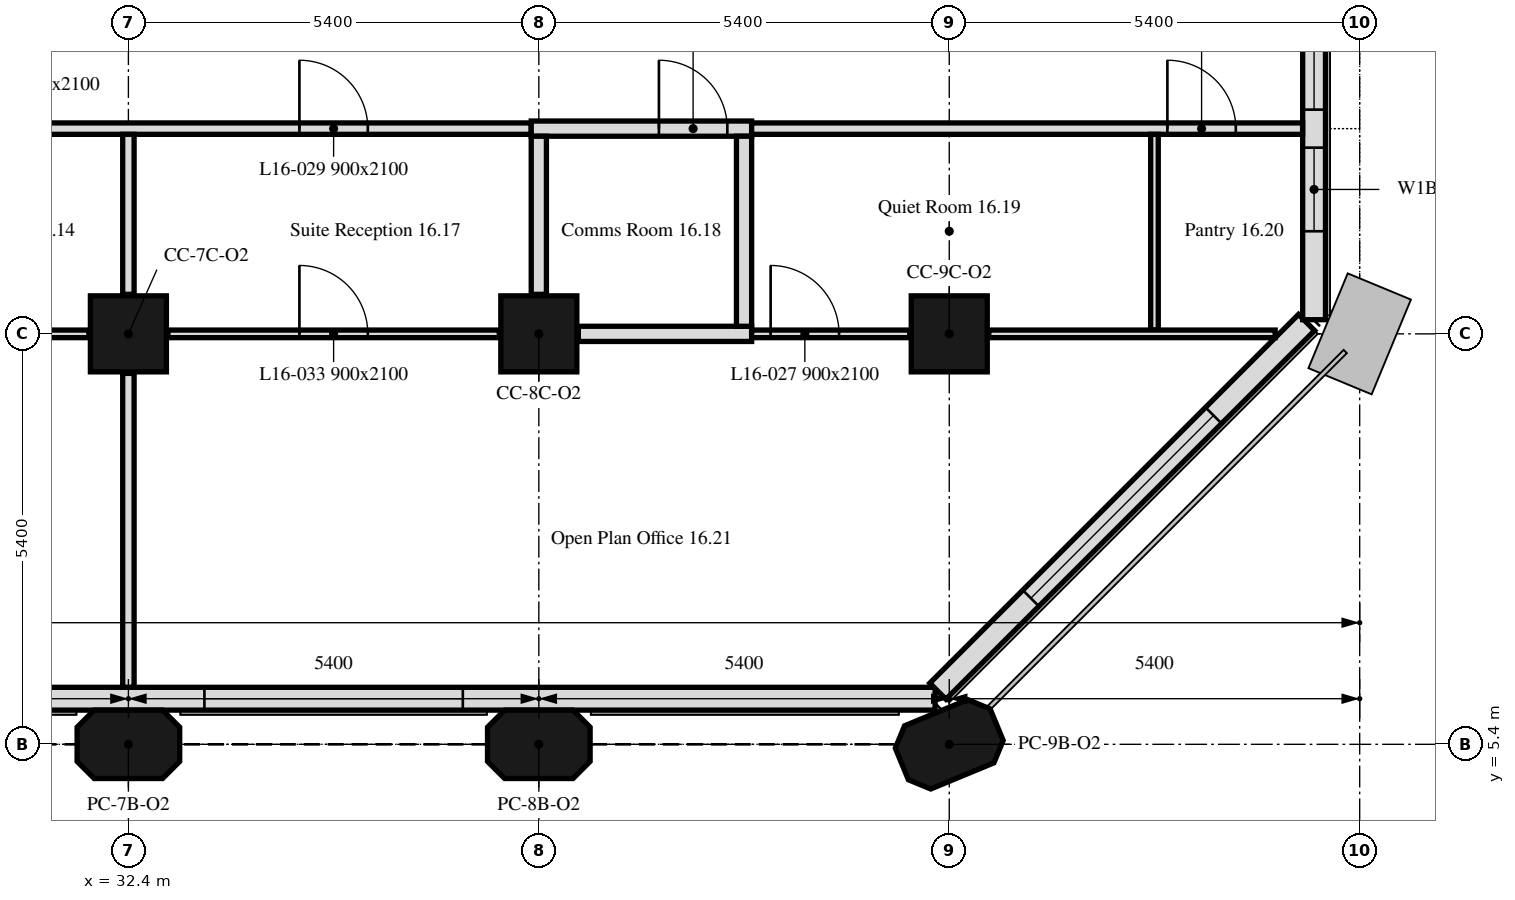
"""IFC4 building model, lengths in metres.
Left out: names, types, materials, properties, quantities, classifications, styles, units other than length and angle.
Written with IfcOpenShell. Run it as: python <this file> out.ifc"""

import sys

from ifc_helpers import new_model, si_unit, direction, frame, frame_2d, origin, origin_2d, place, context, subcontext, project, spatial, polyline, rectangle, outline, extrude, element, fill, save


model = new_model("IFC4")
c1 = context("Model", 3, precision=1e-05, world=origin(), true_north=direction((0.0, 1.0)))
c2 = subcontext(c1, "Body", "Model", "MODEL_VIEW")
j1 = project(units=[si_unit("LENGTHUNIT", "METRE"), si_unit("PLANEANGLEUNIT", "RADIAN")], contexts=[c1])
p1 = place(None, origin())
s1 = spatial("IfcSite", under=j1, at=p1, CompositionType="ELEMENT")
p2 = place(p1, origin())
s2 = spatial("IfcBuilding", under=s1, at=p2, CompositionType="ELEMENT")
p3 = place(p2, frame((0.0, 0.0, 72.6)))
s3 = spatial("IfcBuildingStorey", under=s2, at=p3, CompositionType="ELEMENT", Elevation=72.6)
for number, where, z_axis, x_axis in (
    (1, (32.4, 5.4, 0.0), (0.0, 0.0, 1.0), (1.0, 0.0, 0.0)),
    (2, (37.8, 5.4, 0.0), (0.0, 0.0, 1.0), (1.0, 0.0, 0.0)),
    (3, (43.2, 5.4, 0.0), (0.0, 0.0, 1.0), (0.924, 0.383, 0.0)),
):
    element("IfcColumn", number, at=place(p3, frame(where, z_axis=z_axis, x_axis=x_axis)), inside=s3, PredefinedType="COLUMN", context=c2, shape_type="SweptSolid", body=[
        extrude(outline(polyline([(-0.45, -0.45), (0.45, -0.45), (0.675, -0.225), (0.675, 0.225), (0.45, 0.45), (-0.45, 0.45), (-0.675, 0.225), (-0.675, -0.225), (-0.45, -0.45)])), origin(), (0.0, 0.0, 1.0), 3.5),
    ])
for number, where, z_axis, x_axis in (
    (4, (32.4, 10.8, 0.0), (0.0, 0.0, 1.0), (1.0, 0.0, 0.0)),
    (5, (37.8, 10.8, 0.0), (0.0, 0.0, 1.0), (1.0, 0.0, 0.0)),
    (6, (43.2, 10.8, 0.0), (0.0, 0.0, 1.0), (1.0, 0.0, 0.0)),
):
    element("IfcColumn", number, at=place(p3, frame(where, z_axis=z_axis, x_axis=x_axis)), inside=s3, PredefinedType="COLUMN", context=c2, shape_type="SweptSolid", body=[
        extrude(rectangle(XDim=1.0, YDim=1.0, at=origin_2d()), origin(), (0.0, 0.0, 1.0), 3.5),
    ])
p4 = place(p3, frame((10.986, 6.0, 0.0), z_axis=(0.0, 0.0, 1.0), x_axis=(1.0, 0.0, 0.0)))
e7 = element("IfcWall", 7, at=p4, inside=s3, PredefinedType="SOLIDWALL", context=c2, shape_type="SweptSolid", body=[
    extrude(rectangle(XDim=32.027, YDim=0.3, at=frame_2d((16.014, 0.0))), origin(), (0.0, 0.0, 1.0), 3.5),
])
p5 = place(p4, frame((0.814, 0.0, 0.9)))
e8 = element("IfcOpeningElement", 8, at=p5, cuts=e7, PredefinedType="OPENING", context=c2, shape_type="SweptSolid", body=[
    extrude(rectangle(XDim=3.4, YDim=1.7, at=frame_2d((1.7, 0.85))), frame((0.0, 0.16, 0.0), z_axis=(0.0, -1.0, 0.0), x_axis=(1.0, 0.0, 0.0)), (0.0, 0.0, 1.0), 0.32),
])
p6 = place(p4, frame((11.614, 0.0, 0.9)))
e9 = element("IfcOpeningElement", 9, at=p6, cuts=e7, PredefinedType="OPENING", context=c2, shape_type="SweptSolid", body=[
    extrude(rectangle(XDim=3.4, YDim=1.7, at=frame_2d((1.7, 0.85))), frame((0.0, 0.16, 0.0), z_axis=(0.0, -1.0, 0.0), x_axis=(1.0, 0.0, 0.0)), (0.0, 0.0, 1.0), 0.32),
])
p7 = place(p4, frame((22.414, 0.0, 0.9)))
e10 = element("IfcOpeningElement", 10, at=p7, cuts=e7, PredefinedType="OPENING", context=c2, shape_type="SweptSolid", body=[
    extrude(rectangle(XDim=3.4, YDim=1.7, at=frame_2d((1.7, 0.85))), frame((0.0, 0.16, 0.0), z_axis=(0.0, -1.0, 0.0), x_axis=(1.0, 0.0, 0.0)), (0.0, 0.0, 1.0), 0.32),
])
p8 = place(p3, frame((43.051, 6.099, 0.0), z_axis=(0.0, 0.0, 1.0), x_axis=(0.707106781187, 0.707106781187, 0.0)))
e11 = element("IfcWall", 11, at=p8, inside=s3, PredefinedType="SOLIDWALL", context=c2, shape_type="SweptSolid", body=[
    extrude(rectangle(XDim=6.86, YDim=0.3, at=frame_2d((3.43, 0.0))), origin(), (0.0, 0.0, 1.0), 3.5),
])
p9 = place(p8, frame((1.73, 0.0, 0.9)))
e12 = element("IfcOpeningElement", 12, at=p9, cuts=e11, PredefinedType="OPENING", context=c2, shape_type="SweptSolid", body=[
    extrude(rectangle(XDim=3.4, YDim=1.7, at=frame_2d((1.7, 0.85))), frame((0.0, 0.16, 0.0), z_axis=(0.0, -1.0, 0.0), x_axis=(1.0, 0.0, 0.0)), (0.0, 0.0, 1.0), 0.32),
])
p10 = place(p3, frame((48.0, 10.986, 0.0), z_axis=(0.0, 0.0, 1.0), x_axis=(0.0, 1.0, 0.0)))
e13 = element("IfcWall", 13, at=p10, inside=s3, PredefinedType="SOLIDWALL", context=c2, shape_type="SweptSolid", body=[
    extrude(rectangle(XDim=32.027, YDim=0.3, at=frame_2d((16.014, 0.0))), origin(), (0.0, 0.0, 1.0), 3.5),
])
p11 = place(p10, frame((1.164, 0.0, 0.9)))
e14 = element("IfcOpeningElement", 14, at=p11, cuts=e13, PredefinedType="OPENING", context=c2, shape_type="SweptSolid", body=[
    extrude(rectangle(XDim=1.1, YDim=1.7, at=frame_2d((0.55, 0.85))), frame((0.0, 0.16, 0.0), z_axis=(0.0, -1.0, 0.0), x_axis=(1.0, 0.0, 0.0)), (0.0, 0.0, 1.0), 0.32),
])
p12 = place(p10, frame((2.764, 0.0, 0.9)))
e15 = element("IfcOpeningElement", 15, at=p12, cuts=e13, PredefinedType="OPENING", context=c2, shape_type="SweptSolid", body=[
    extrude(rectangle(XDim=1.1, YDim=1.7, at=frame_2d((0.55, 0.85))), frame((0.0, 0.16, 0.0), z_axis=(0.0, -1.0, 0.0), x_axis=(1.0, 0.0, 0.0)), (0.0, 0.0, 1.0), 0.32),
])
p13 = place(p10, frame((11.614, 0.0, 0.9)))
e16 = element("IfcOpeningElement", 16, at=p13, cuts=e13, PredefinedType="OPENING", context=c2, shape_type="SweptSolid", body=[
    extrude(rectangle(XDim=3.4, YDim=1.7, at=frame_2d((1.7, 0.85))), frame((0.0, 0.16, 0.0), z_axis=(0.0, -1.0, 0.0), x_axis=(1.0, 0.0, 0.0)), (0.0, 0.0, 1.0), 0.32),
])
p14 = place(p10, frame((22.764, 0.0, 0.9)))
e17 = element("IfcOpeningElement", 17, at=p14, cuts=e13, PredefinedType="OPENING", context=c2, shape_type="SweptSolid", body=[
    extrude(rectangle(XDim=1.1, YDim=1.7, at=frame_2d((0.55, 0.85))), frame((0.0, 0.16, 0.0), z_axis=(0.0, -1.0, 0.0), x_axis=(1.0, 0.0, 0.0)), (0.0, 0.0, 1.0), 0.32),
])
p15 = place(p10, frame((24.364, 0.0, 0.9)))
e18 = element("IfcOpeningElement", 18, at=p15, cuts=e13, PredefinedType="OPENING", context=c2, shape_type="SweptSolid", body=[
    extrude(rectangle(XDim=1.1, YDim=1.7, at=frame_2d((0.55, 0.85))), frame((0.0, 0.16, 0.0), z_axis=(0.0, -1.0, 0.0), x_axis=(1.0, 0.0, 0.0)), (0.0, 0.0, 1.0), 0.32),
])
p16 = place(p3, frame((24.4, 13.5, 0.0), z_axis=(0.0, 0.0, 1.0), x_axis=(1.0, 0.0, 0.0)))
e19 = element("IfcWall", 19, at=p16, inside=s3, PredefinedType="PARTITIONING", context=c2, shape_type="SweptSolid", body=[
    extrude(rectangle(XDim=13.3, YDim=0.15, at=frame_2d((6.65, 0.0))), origin(), (0.0, 0.0, 1.0), 3.5),
])
p17 = place(p16, frame((10.25, 0.0, 0.0)))
e20 = element("IfcOpeningElement", 20, at=p17, cuts=e19, PredefinedType="OPENING", context=c2, shape_type="SweptSolid", body=[
    extrude(rectangle(XDim=0.9, YDim=2.1, at=frame_2d((0.45, 1.05))), frame((0.0, 0.075, 0.0), z_axis=(0.0, -1.0, 0.0), x_axis=(1.0, 0.0, 0.0)), (0.0, 0.0, 1.0), 0.15),
])
p18 = place(p16, frame((4.23, 0.0, 0.0)))
e21 = element("IfcOpeningElement", 21, at=p18, cuts=e19, PredefinedType="OPENING", context=c2, shape_type="SweptSolid", body=[
    extrude(rectangle(XDim=0.9, YDim=2.1, at=frame_2d((0.45, 1.05))), frame((0.0, 0.075, 0.0), z_axis=(0.0, -1.0, 0.0), x_axis=(1.0, 0.0, 0.0)), (0.0, 0.0, 1.0), 0.15),
])
p19 = place(p3, frame((37.7, 13.5, 0.0), z_axis=(0.0, 0.0, 1.0), x_axis=(1.0, 0.0, 0.0)))
e22 = element("IfcWall", 22, at=p19, inside=s3, PredefinedType="PARTITIONING", context=c2, shape_type="SweptSolid", body=[
    extrude(rectangle(XDim=2.9, YDim=0.2, at=frame_2d((1.45, 0.0))), origin(), (0.0, 0.0, 1.0), 3.5),
])
p20 = place(p19, frame((1.68, 0.0, 0.0)))
e23 = element("IfcOpeningElement", 23, at=p20, cuts=e22, PredefinedType="OPENING", context=c2, shape_type="SweptSolid", body=[
    extrude(rectangle(XDim=0.9, YDim=2.1, at=frame_2d((0.45, 1.05))), frame((0.0, 0.1, 0.0), z_axis=(0.0, -1.0, 0.0), x_axis=(1.0, 0.0, 0.0)), (0.0, 0.0, 1.0), 0.2),
])
p21 = place(p3, frame((40.6, 13.5, 0.0), z_axis=(0.0, 0.0, 1.0), x_axis=(1.0, 0.0, 0.0)))
e24 = element("IfcWall", 24, at=p21, inside=s3, PredefinedType="PARTITIONING", context=c2, shape_type="SweptSolid", body=[
    extrude(rectangle(XDim=7.249, YDim=0.15, at=frame_2d((3.625, 0.0))), origin(), (0.0, 0.0, 1.0), 3.5),
])
p22 = place(p21, frame((5.47, 0.0, 0.0)))
e25 = element("IfcOpeningElement", 25, at=p22, cuts=e24, PredefinedType="OPENING", context=c2, shape_type="SweptSolid", body=[
    extrude(rectangle(XDim=0.9, YDim=2.1, at=frame_2d((0.45, 1.05))), frame((0.0, 0.075, 0.0), z_axis=(0.0, -1.0, 0.0), x_axis=(1.0, 0.0, 0.0)), (0.0, 0.0, 1.0), 0.15),
])
p23 = place(p3, frame((27.52, 10.8, 0.0), z_axis=(0.0, 0.0, 1.0), x_axis=(1.0, 0.0, 0.0)))
e26 = element("IfcWall", 26, at=p23, inside=s3, PredefinedType="PARTITIONING", context=c2, shape_type="SweptSolid", body=[
    extrude(rectangle(XDim=4.36, YDim=0.1, at=frame_2d((2.18, 0.0))), origin(), (0.0, 0.0, 1.0), 3.5),
])
p24 = place(p3, frame((32.4, 11.32, 0.0), z_axis=(0.0, 0.0, 1.0), x_axis=(0.0, 1.0, 0.0)))
e27 = element("IfcWall", 27, at=p24, inside=s3, PredefinedType="PARTITIONING", context=c2, shape_type="SweptSolid", body=[
    extrude(rectangle(XDim=2.105, YDim=0.15, at=frame_2d((1.052, 0.0))), origin(), (0.0, 0.0, 1.0), 3.5),
])
p25 = place(p3, frame((32.4, 6.151, 0.0), z_axis=(0.0, 0.0, 1.0), x_axis=(0.0, 1.0, 0.0)))
e28 = element("IfcWall", 28, at=p25, inside=s3, PredefinedType="PARTITIONING", context=c2, shape_type="SweptSolid", body=[
    extrude(rectangle(XDim=4.129, YDim=0.15, at=frame_2d((2.064, 0.0))), origin(), (0.0, 0.0, 1.0), 3.5),
])
p26 = place(p3, frame((32.92, 10.8, 0.0), z_axis=(0.0, 0.0, 1.0), x_axis=(1.0, 0.0, 0.0)))
e29 = element("IfcWall", 29, at=p26, inside=s3, PredefinedType="PARTITIONING", context=c2, shape_type="SweptSolid", body=[
    extrude(rectangle(XDim=4.36, YDim=0.1, at=frame_2d((2.18, 0.0))), origin(), (0.0, 0.0, 1.0), 3.5),
])
p27 = place(p26, frame((1.73, 0.0, 0.0)))
e30 = element("IfcOpeningElement", 30, at=p27, cuts=e29, PredefinedType="OPENING", context=c2, shape_type="SweptSolid", body=[
    extrude(rectangle(XDim=0.9, YDim=2.1, at=frame_2d((0.45, 1.05))), frame((0.0, 0.05, 0.0), z_axis=(0.0, -1.0, 0.0), x_axis=(1.0, 0.0, 0.0)), (0.0, 0.0, 1.0), 0.1),
])
p28 = place(p3, frame((37.8, 11.32, 0.0), z_axis=(0.0, 0.0, 1.0), x_axis=(0.0, 1.0, 0.0)))
e31 = element("IfcWall", 31, at=p28, inside=s3, PredefinedType="PARTITIONING", context=c2, shape_type="SweptSolid", body=[
    extrude(rectangle(XDim=2.08, YDim=0.2, at=frame_2d((1.04, 0.0))), origin(), (0.0, 0.0, 1.0), 3.5),
])
p29 = place(p3, frame((38.32, 10.8, 0.0), z_axis=(0.0, 0.0, 1.0), x_axis=(1.0, 0.0, 0.0)))
e32 = element("IfcWall", 32, at=p29, inside=s3, PredefinedType="PARTITIONING", context=c2, shape_type="SweptSolid", body=[
    extrude(rectangle(XDim=2.28, YDim=0.2, at=frame_2d((1.14, 0.0))), origin(), (0.0, 0.0, 1.0), 3.5),
])
p30 = place(p3, frame((40.5, 10.9, 0.0), z_axis=(0.0, 0.0, 1.0), x_axis=(0.0, 1.0, 0.0)))
e33 = element("IfcWall", 33, at=p30, inside=s3, PredefinedType="PARTITIONING", context=c2, shape_type="SweptSolid", body=[
    extrude(rectangle(XDim=2.5, YDim=0.2, at=frame_2d((1.25, 0.0))), origin(), (0.0, 0.0, 1.0), 3.5),
])
p31 = place(p3, frame((40.6, 10.8, 0.0), z_axis=(0.0, 0.0, 1.0), x_axis=(1.0, 0.0, 0.0)))
e34 = element("IfcWall", 34, at=p31, inside=s3, PredefinedType="PARTITIONING", context=c2, shape_type="SweptSolid", body=[
    extrude(rectangle(XDim=2.08, YDim=0.1, at=frame_2d((1.04, 0.0))), origin(), (0.0, 0.0, 1.0), 3.5),
])
p32 = place(p31, frame((0.25, 0.0, 0.0)))
e35 = element("IfcOpeningElement", 35, at=p32, cuts=e34, PredefinedType="OPENING", context=c2, shape_type="SweptSolid", body=[
    extrude(rectangle(XDim=0.9, YDim=2.1, at=frame_2d((0.45, 1.05))), frame((0.0, 0.05, 0.0), z_axis=(0.0, -1.0, 0.0), x_axis=(1.0, 0.0, 0.0)), (0.0, 0.0, 1.0), 0.1),
])
p33 = place(p3, frame((45.9, 10.85, 0.0), z_axis=(0.0, 0.0, 1.0), x_axis=(0.0, 1.0, 0.0)))
e36 = element("IfcWall", 36, at=p33, inside=s3, PredefinedType="PARTITIONING", context=c2, shape_type="SweptSolid", body=[
    extrude(rectangle(XDim=2.575, YDim=0.1, at=frame_2d((1.288, 0.0))), origin(), (0.0, 0.0, 1.0), 3.5),
])
p34 = place(p3, frame((43.72, 10.8, 0.0), z_axis=(0.0, 0.0, 1.0), x_axis=(1.0, 0.0, 0.0)))
e37 = element("IfcWall", 37, at=p34, inside=s3, PredefinedType="PARTITIONING", context=c2, shape_type="SweptSolid", body=[
    extrude(rectangle(XDim=3.768, YDim=0.1, at=frame_2d((1.884, 0.0))), origin(), (0.0, 0.0, 1.0), 3.5),
])
p35 = place(p7, origin())
e38 = element("IfcWindow", 38, at=p35, inside=s3, PartitioningType="SINGLE_PANEL", PredefinedType="WINDOW", context=c2, shape_type="SweptSolid", body=[
    extrude(rectangle(XDim=3.4, YDim=1.7, at=frame_2d((1.7, 0.85))), frame((0.0, 0.03, 0.0), z_axis=(0.0, -1.0, 0.0), x_axis=(1.0, 0.0, 0.0)), (0.0, 0.0, 1.0), 0.06),
])
fill(e10, e38)
p36 = place(p9, origin())
e39 = element("IfcWindow", 39, at=p36, inside=s3, PartitioningType="SINGLE_PANEL", PredefinedType="WINDOW", context=c2, shape_type="SweptSolid", body=[
    extrude(rectangle(XDim=3.4, YDim=1.7, at=frame_2d((1.7, 0.85))), frame((0.0, 0.03, 0.0), z_axis=(0.0, -1.0, 0.0), x_axis=(1.0, 0.0, 0.0)), (0.0, 0.0, 1.0), 0.06),
])
fill(e12, e39)
p37 = place(p11, origin())
e40 = element("IfcWindow", 40, at=p37, inside=s3, PartitioningType="SINGLE_PANEL", PredefinedType="WINDOW", context=c2, shape_type="SweptSolid", body=[
    extrude(rectangle(XDim=1.1, YDim=1.7, at=frame_2d((0.55, 0.85))), frame((0.0, 0.03, 0.0), z_axis=(0.0, -1.0, 0.0), x_axis=(1.0, 0.0, 0.0)), (0.0, 0.0, 1.0), 0.06),
])
fill(e14, e40)
p38 = place(p12, origin())
e41 = element("IfcWindow", 41, at=p38, inside=s3, PartitioningType="SINGLE_PANEL", PredefinedType="WINDOW", context=c2, shape_type="SweptSolid", body=[
    extrude(rectangle(XDim=1.1, YDim=1.7, at=frame_2d((0.55, 0.85))), frame((0.0, 0.03, 0.0), z_axis=(0.0, -1.0, 0.0), x_axis=(1.0, 0.0, 0.0)), (0.0, 0.0, 1.0), 0.06),
])
fill(e15, e41)
p39 = place(p20, origin())
e42 = element("IfcDoor", 42, at=p39, inside=s3, OperationType="SINGLE_SWING_LEFT", PredefinedType="DOOR", context=c2, shape_type="SweptSolid", body=[
    extrude(rectangle(XDim=0.9, YDim=2.1, at=frame_2d((0.45, 1.05))), frame((0.0, 0.025, 0.0), z_axis=(0.0, -1.0, 0.0), x_axis=(1.0, 0.0, 0.0)), (0.0, 0.0, 1.0), 0.05),
])
fill(e23, e42)
p40 = place(p22, origin())
e43 = element("IfcDoor", 43, at=p40, inside=s3, OperationType="SINGLE_SWING_LEFT", PredefinedType="DOOR", context=c2, shape_type="SweptSolid", body=[
    extrude(rectangle(XDim=0.9, YDim=2.1, at=frame_2d((0.45, 1.05))), frame((0.0, 0.025, 0.0), z_axis=(0.0, -1.0, 0.0), x_axis=(1.0, 0.0, 0.0)), (0.0, 0.0, 1.0), 0.05),
])
fill(e25, e43)
p41 = place(p32, origin())
e44 = element("IfcDoor", 44, at=p41, inside=s3, OperationType="SINGLE_SWING_LEFT", PredefinedType="DOOR", context=c2, shape_type="SweptSolid", body=[
    extrude(rectangle(XDim=0.9, YDim=2.1, at=frame_2d((0.45, 1.05))), frame((0.0, 0.025, 0.0), z_axis=(0.0, -1.0, 0.0), x_axis=(1.0, 0.0, 0.0)), (0.0, 0.0, 1.0), 0.05),
])
fill(e35, e44)
p42 = place(p17, origin())
e45 = element("IfcDoor", 45, at=p42, inside=s3, OperationType="SINGLE_SWING_LEFT", PredefinedType="DOOR", context=c2, shape_type="SweptSolid", body=[
    extrude(rectangle(XDim=0.9, YDim=2.1, at=frame_2d((0.45, 1.05))), frame((0.0, 0.025, 0.0), z_axis=(0.0, -1.0, 0.0), x_axis=(1.0, 0.0, 0.0)), (0.0, 0.0, 1.0), 0.05),
])
fill(e20, e45)
p43 = place(p27, origin())
e46 = element("IfcDoor", 46, at=p43, inside=s3, OperationType="SINGLE_SWING_RIGHT", PredefinedType="DOOR", context=c2, shape_type="SweptSolid", body=[
    extrude(rectangle(XDim=0.9, YDim=2.1, at=frame_2d((0.45, 1.05))), frame((0.0, 0.025, 0.0), z_axis=(0.0, -1.0, 0.0), x_axis=(1.0, 0.0, 0.0)), (0.0, 0.0, 1.0), 0.05),
])
fill(e30, e46)
save(model, sys.argv[1])
